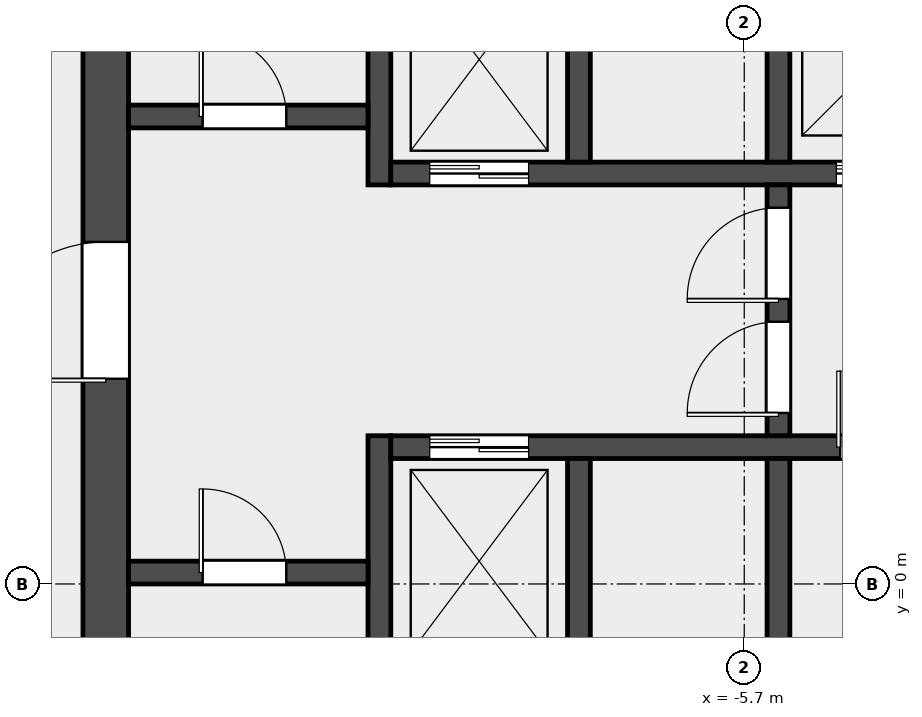
"""IFC4 building model, lengths in metres.
Left out: names, types, materials, properties, quantities, classifications, styles, units other than length and angle.
Written with IfcOpenShell. Run it as: python <this file> out.ifc"""

import sys

from ifc_helpers import new_model, si_unit, direction, frame, frame_2d, origin, place, context, subcontext, project, spatial, rectangle, extrude, element, fill, save


model = new_model("IFC4")
c1 = context("Model", 3, precision=1e-05, world=origin(), true_north=direction((0.0, 1.0)))
c2 = subcontext(c1, "Body", "Model", "MODEL_VIEW")
j1 = project(units=[si_unit("LENGTHUNIT", "METRE"), si_unit("PLANEANGLEUNIT", "RADIAN")], contexts=[c1])
p1 = place(None, origin())
s1 = spatial("IfcSite", under=j1, at=p1, CompositionType="ELEMENT")
p2 = place(p1, origin())
s2 = spatial("IfcBuilding", under=s1, at=p2, CompositionType="ELEMENT")
p3 = place(p2, frame((0.0, 0.0, 283.4)))
s3 = spatial("IfcBuildingStorey", under=s2, at=p3, CompositionType="ELEMENT", Elevation=283.4)
p4 = place(p3, frame((-14.1, -6.6, 0.0), z_axis=(0.0, 0.0, 1.0), x_axis=(0.0, 1.0, 0.0)))
e1 = element("IfcWall", 1, at=p4, inside=s3, PredefinedType="SHEAR", context=c2, shape_type="SweptSolid", body=[
    extrude(rectangle(XDim=19.5, YDim=0.6, at=frame_2d((9.75, 0.0))), origin(), (0.0, 0.0, 1.0), 3.7),
])
p5 = place(p4, frame((9.3, 0.0, 0.0)))
e2 = element("IfcOpeningElement", 2, at=p5, cuts=e1, PredefinedType="OPENING", context=c2, shape_type="SweptSolid", body=[
    extrude(rectangle(XDim=1.8, YDim=2.1, at=frame_2d((0.9, 1.05))), frame((0.0, 0.312, 0.0), z_axis=(0.0, -1.0, 0.0), x_axis=(1.0, 0.0, 0.0)), (0.0, 0.0, 1.0), 0.624),
])
p6 = place(p3, frame((-10.5, -6.6, 0.0), z_axis=(0.0, 0.0, 1.0), x_axis=(0.0, 1.0, 0.0)))
e3 = element("IfcWall", 3, at=p6, inside=s3, PredefinedType="SHEAR", context=c2, shape_type="SweptSolid", body=[
    extrude(rectangle(XDim=8.55, YDim=0.3, at=frame_2d((4.275, 0.0))), origin(), (0.0, 0.0, 1.0), 3.7),
])
p7 = place(p3, frame((-10.5, 5.25, 0.0), z_axis=(0.0, 0.0, 1.0), x_axis=(0.0, 1.0, 0.0)))
e4 = element("IfcWall", 4, at=p7, inside=s3, PredefinedType="SHEAR", context=c2, shape_type="SweptSolid", body=[
    extrude(rectangle(XDim=7.65, YDim=0.3, at=frame_2d((3.825, 0.0))), origin(), (0.0, 0.0, 1.0), 3.7),
])
p8 = place(p3, frame((-13.8, 0.15, 0.0), z_axis=(0.0, 0.0, 1.0), x_axis=(1.0, 0.0, 0.0)))
e5 = element("IfcWall", 5, at=p8, inside=s3, PredefinedType="SOLIDWALL", context=c2, shape_type="SweptSolid", body=[
    extrude(rectangle(XDim=3.15, YDim=0.3, at=frame_2d((1.575, 0.0))), origin(), (0.0, 0.0, 1.0), 3.7),
])
p9 = place(p8, frame((0.975, 0.0, 0.0)))
e6 = element("IfcOpeningElement", 6, at=p9, cuts=e5, PredefinedType="OPENING", context=c2, shape_type="SweptSolid", body=[
    extrude(rectangle(XDim=1.1, YDim=2.1, at=frame_2d((0.55, 1.05))), frame((0.0, 0.162, 0.0), z_axis=(0.0, -1.0, 0.0), x_axis=(1.0, 0.0, 0.0)), (0.0, 0.0, 1.0), 0.324),
])
p10 = place(p3, frame((-13.8, 6.15, 0.0), z_axis=(0.0, 0.0, 1.0), x_axis=(1.0, 0.0, 0.0)))
e7 = element("IfcWall", 7, at=p10, inside=s3, PredefinedType="SOLIDWALL", context=c2, shape_type="SweptSolid", body=[
    extrude(rectangle(XDim=3.15, YDim=0.3, at=frame_2d((1.575, 0.0))), origin(), (0.0, 0.0, 1.0), 3.7),
])
p11 = place(p10, frame((0.975, 0.0, 0.0)))
e8 = element("IfcOpeningElement", 8, at=p11, cuts=e7, PredefinedType="OPENING", context=c2, shape_type="SweptSolid", body=[
    extrude(rectangle(XDim=1.1, YDim=2.1, at=frame_2d((0.55, 1.05))), frame((0.0, 0.162, 0.0), z_axis=(0.0, -1.0, 0.0), x_axis=(1.0, 0.0, 0.0)), (0.0, 0.0, 1.0), 0.324),
])
p12 = place(p3, frame((-10.35, 1.8, 0.0), z_axis=(0.0, 0.0, 1.0), x_axis=(1.0, 0.0, 0.0)))
e9 = element("IfcWall", 9, at=p12, inside=s3, PredefinedType="SOLIDWALL", context=c2, shape_type="SweptSolid", body=[
    extrude(rectangle(XDim=20.7, YDim=0.3, at=frame_2d((10.35, 0.0))), origin(), (0.0, 0.0, 1.0), 3.7),
])
p13 = place(p12, frame((0.512, 0.0, 0.0)))
e10 = element("IfcOpeningElement", 10, at=p13, cuts=e9, PredefinedType="OPENING", context=c2, shape_type="SweptSolid", body=[
    extrude(rectangle(XDim=1.3, YDim=2.1, at=frame_2d((0.65, 1.05))), frame((0.0, 0.162, 0.0), z_axis=(0.0, -1.0, 0.0), x_axis=(1.0, 0.0, 0.0)), (0.0, 0.0, 1.0), 0.324),
])
p14 = place(p12, frame((5.913, 0.0, 0.0)))
e11 = element("IfcOpeningElement", 11, at=p14, cuts=e9, PredefinedType="OPENING", context=c2, shape_type="SweptSolid", body=[
    extrude(rectangle(XDim=1.0, YDim=2.1, at=frame_2d((0.5, 1.05))), frame((0.0, 0.162, 0.0), z_axis=(0.0, -1.0, 0.0), x_axis=(1.0, 0.0, 0.0)), (0.0, 0.0, 1.0), 0.324),
])
p15 = place(p12, frame((11.163, 0.0, 0.0)))
e12 = element("IfcOpeningElement", 12, at=p15, cuts=e9, PredefinedType="OPENING", context=c2, shape_type="SweptSolid", body=[
    extrude(rectangle(XDim=1.0, YDim=2.1, at=frame_2d((0.5, 1.05))), frame((0.0, 0.162, 0.0), z_axis=(0.0, -1.0, 0.0), x_axis=(1.0, 0.0, 0.0)), (0.0, 0.0, 1.0), 0.324),
])
p16 = place(p12, frame((17.725, 0.0, 0.0)))
e13 = element("IfcOpeningElement", 13, at=p16, cuts=e9, PredefinedType="OPENING", context=c2, shape_type="SweptSolid", body=[
    extrude(rectangle(XDim=1.0, YDim=2.1, at=frame_2d((0.5, 1.05))), frame((0.0, 0.162, 0.0), z_axis=(0.0, -1.0, 0.0), x_axis=(1.0, 0.0, 0.0)), (0.0, 0.0, 1.0), 0.324),
])
p17 = place(p3, frame((-10.35, 5.4, 0.0), z_axis=(0.0, 0.0, 1.0), x_axis=(1.0, 0.0, 0.0)))
e14 = element("IfcWall", 14, at=p17, inside=s3, PredefinedType="SOLIDWALL", context=c2, shape_type="SweptSolid", body=[
    extrude(rectangle(XDim=20.7, YDim=0.3, at=frame_2d((10.35, 0.0))), origin(), (0.0, 0.0, 1.0), 3.7),
])
p18 = place(p17, frame((0.512, 0.0, 0.0)))
e15 = element("IfcOpeningElement", 15, at=p18, cuts=e14, PredefinedType="OPENING", context=c2, shape_type="SweptSolid", body=[
    extrude(rectangle(XDim=1.3, YDim=2.1, at=frame_2d((0.65, 1.05))), frame((0.0, 0.162, 0.0), z_axis=(0.0, -1.0, 0.0), x_axis=(1.0, 0.0, 0.0)), (0.0, 0.0, 1.0), 0.324),
])
p19 = place(p17, frame((5.863, 0.0, 0.0)))
e16 = element("IfcOpeningElement", 16, at=p19, cuts=e14, PredefinedType="OPENING", context=c2, shape_type="SweptSolid", body=[
    extrude(rectangle(XDim=1.1, YDim=2.1, at=frame_2d((0.55, 1.05))), frame((0.0, 0.162, 0.0), z_axis=(0.0, -1.0, 0.0), x_axis=(1.0, 0.0, 0.0)), (0.0, 0.0, 1.0), 0.324),
])
p20 = place(p17, frame((8.488, 0.0, 0.0)))
e17 = element("IfcOpeningElement", 17, at=p20, cuts=e14, PredefinedType="OPENING", context=c2, shape_type="SweptSolid", body=[
    extrude(rectangle(XDim=1.1, YDim=2.1, at=frame_2d((0.55, 1.05))), frame((0.0, 0.162, 0.0), z_axis=(0.0, -1.0, 0.0), x_axis=(1.0, 0.0, 0.0)), (0.0, 0.0, 1.0), 0.324),
])
p21 = place(p17, frame((11.113, 0.0, 0.0)))
e18 = element("IfcOpeningElement", 18, at=p21, cuts=e14, PredefinedType="OPENING", context=c2, shape_type="SweptSolid", body=[
    extrude(rectangle(XDim=1.1, YDim=2.1, at=frame_2d((0.55, 1.05))), frame((0.0, 0.162, 0.0), z_axis=(0.0, -1.0, 0.0), x_axis=(1.0, 0.0, 0.0)), (0.0, 0.0, 1.0), 0.324),
])
p22 = place(p17, frame((13.738, 0.0, 0.0)))
e19 = element("IfcOpeningElement", 19, at=p22, cuts=e14, PredefinedType="OPENING", context=c2, shape_type="SweptSolid", body=[
    extrude(rectangle(XDim=1.1, YDim=2.1, at=frame_2d((0.55, 1.05))), frame((0.0, 0.162, 0.0), z_axis=(0.0, -1.0, 0.0), x_axis=(1.0, 0.0, 0.0)), (0.0, 0.0, 1.0), 0.324),
])
p23 = place(p17, frame((16.363, 0.0, 0.0)))
e20 = element("IfcOpeningElement", 20, at=p23, cuts=e14, PredefinedType="OPENING", context=c2, shape_type="SweptSolid", body=[
    extrude(rectangle(XDim=1.1, YDim=2.1, at=frame_2d((0.55, 1.05))), frame((0.0, 0.162, 0.0), z_axis=(0.0, -1.0, 0.0), x_axis=(1.0, 0.0, 0.0)), (0.0, 0.0, 1.0), 0.324),
])
p24 = place(p17, frame((18.988, 0.0, 0.0)))
e21 = element("IfcOpeningElement", 21, at=p24, cuts=e14, PredefinedType="OPENING", context=c2, shape_type="SweptSolid", body=[
    extrude(rectangle(XDim=1.1, YDim=2.1, at=frame_2d((0.55, 1.05))), frame((0.0, 0.162, 0.0), z_axis=(0.0, -1.0, 0.0), x_axis=(1.0, 0.0, 0.0)), (0.0, 0.0, 1.0), 0.324),
])
for number, where, z_axis, x_axis in (
    (22, (-7.875, -1.05, 0.0), (0.0, 0.0, 1.0), (0.0, 1.0, 0.0)),
    (23, (-5.25, -1.05, 0.0), (0.0, 0.0, 1.0), (0.0, 1.0, 0.0)),
    (24, (-7.875, 5.55, 0.0), (0.0, 0.0, 1.0), (0.0, 1.0, 0.0)),
    (25, (-5.25, 5.55, 0.0), (0.0, 0.0, 1.0), (0.0, 1.0, 0.0)),
):
    element("IfcWall", number, at=place(p3, frame(where, z_axis=z_axis, x_axis=x_axis)), inside=s3, PredefinedType="SOLIDWALL", context=c2, shape_type="SweptSolid", body=[
        extrude(rectangle(XDim=2.7, YDim=0.3, at=frame_2d((1.35, 0.0))), origin(), (0.0, 0.0, 1.0), 3.7),
    ])
p25 = place(p3, frame((-5.25, 1.95, 0.0), z_axis=(0.0, 0.0, 1.0), x_axis=(0.0, 1.0, 0.0)))
e26 = element("IfcWall", 26, at=p25, inside=s3, PredefinedType="SOLIDWALL", context=c2, shape_type="SweptSolid", body=[
    extrude(rectangle(XDim=3.3, YDim=0.3, at=frame_2d((1.65, 0.0))), origin(), (0.0, 0.0, 1.0), 3.7),
])
p26 = place(p25, frame((0.3, 0.0, 0.0)))
e27 = element("IfcOpeningElement", 27, at=p26, cuts=e26, PredefinedType="OPENING", context=c2, shape_type="SweptSolid", body=[
    extrude(rectangle(XDim=1.2, YDim=2.1, at=frame_2d((0.6, 1.05))), frame((0.0, 0.162, 0.0), z_axis=(0.0, -1.0, 0.0), x_axis=(1.0, 0.0, 0.0)), (0.0, 0.0, 1.0), 0.324),
])
p27 = place(p25, frame((1.8, 0.0, 0.0)))
e28 = element("IfcOpeningElement", 28, at=p27, cuts=e26, PredefinedType="OPENING", context=c2, shape_type="SweptSolid", body=[
    extrude(rectangle(XDim=1.2, YDim=2.1, at=frame_2d((0.6, 1.05))), frame((0.0, 0.162, 0.0), z_axis=(0.0, -1.0, 0.0), x_axis=(1.0, 0.0, 0.0)), (0.0, 0.0, 1.0), 0.324),
])
p28 = place(p9, origin())
e29 = element("IfcDoor", 29, at=p28, inside=s3, OperationType="SINGLE_SWING_LEFT", PredefinedType="DOOR", context=c2, shape_type="SweptSolid", body=[
    extrude(rectangle(XDim=1.1, YDim=2.1, at=frame_2d((0.55, 1.05))), frame((0.0, 0.025, 0.0), z_axis=(0.0, -1.0, 0.0), x_axis=(1.0, 0.0, 0.0)), (0.0, 0.0, 1.0), 0.05),
])
fill(e6, e29)
p29 = place(p11, origin())
e30 = element("IfcDoor", 30, at=p29, inside=s3, OperationType="SINGLE_SWING_LEFT", PredefinedType="DOOR", context=c2, shape_type="SweptSolid", body=[
    extrude(rectangle(XDim=1.1, YDim=2.1, at=frame_2d((0.55, 1.05))), frame((0.0, 0.025, 0.0), z_axis=(0.0, -1.0, 0.0), x_axis=(1.0, 0.0, 0.0)), (0.0, 0.0, 1.0), 0.05),
])
fill(e8, e30)
p30 = place(p5, origin())
e31 = element("IfcDoor", 31, at=p30, inside=s3, OperationType="DOUBLE_DOOR_SINGLE_SWING", PredefinedType="DOOR", context=c2, shape_type="SweptSolid", body=[
    extrude(rectangle(XDim=1.8, YDim=2.1, at=frame_2d((0.9, 1.05))), frame((0.0, 0.025, 0.0), z_axis=(0.0, -1.0, 0.0), x_axis=(1.0, 0.0, 0.0)), (0.0, 0.0, 1.0), 0.05),
])
fill(e2, e31)
p31 = place(p26, origin())
e32 = element("IfcDoor", 32, at=p31, inside=s3, OperationType="SINGLE_SWING_LEFT", PredefinedType="DOOR", context=c2, shape_type="SweptSolid", body=[
    extrude(rectangle(XDim=1.2, YDim=2.1, at=frame_2d((0.6, 1.05))), frame((0.0, 0.025, 0.0), z_axis=(0.0, -1.0, 0.0), x_axis=(1.0, 0.0, 0.0)), (0.0, 0.0, 1.0), 0.05),
])
fill(e27, e32)
p32 = place(p27, origin())
e33 = element("IfcDoor", 33, at=p32, inside=s3, OperationType="SINGLE_SWING_RIGHT", PredefinedType="DOOR", context=c2, shape_type="SweptSolid", body=[
    extrude(rectangle(XDim=1.2, YDim=2.1, at=frame_2d((0.6, 1.05))), frame((0.0, 0.025, 0.0), z_axis=(0.0, -1.0, 0.0), x_axis=(1.0, 0.0, 0.0)), (0.0, 0.0, 1.0), 0.05),
])
fill(e28, e33)
p33 = place(p13, origin())
e34 = element("IfcDoor", 34, at=p33, inside=s3, OperationType="DOUBLE_DOOR_SLIDING", PredefinedType="DOOR", context=c2, shape_type="SweptSolid", body=[
    extrude(rectangle(XDim=1.3, YDim=2.1, at=frame_2d((0.65, 1.05))), frame((0.0, 0.025, 0.0), z_axis=(0.0, -1.0, 0.0), x_axis=(1.0, 0.0, 0.0)), (0.0, 0.0, 1.0), 0.05),
])
fill(e10, e34)
p34 = place(p18, origin())
e35 = element("IfcDoor", 35, at=p34, inside=s3, OperationType="DOUBLE_DOOR_SLIDING", PredefinedType="DOOR", context=c2, shape_type="SweptSolid", body=[
    extrude(rectangle(XDim=1.3, YDim=2.1, at=frame_2d((0.65, 1.05))), frame((0.0, 0.025, 0.0), z_axis=(0.0, -1.0, 0.0), x_axis=(1.0, 0.0, 0.0)), (0.0, 0.0, 1.0), 0.05),
])
fill(e15, e35)
p35 = place(p19, origin())
e36 = element("IfcDoor", 36, at=p35, inside=s3, OperationType="DOUBLE_DOOR_SLIDING", PredefinedType="DOOR", context=c2, shape_type="SweptSolid", body=[
    extrude(rectangle(XDim=1.1, YDim=2.1, at=frame_2d((0.55, 1.05))), frame((0.0, 0.025, 0.0), z_axis=(0.0, -1.0, 0.0), x_axis=(1.0, 0.0, 0.0)), (0.0, 0.0, 1.0), 0.05),
])
fill(e16, e36)
p36 = place(p14, origin())
e37 = element("IfcDoor", 37, at=p36, inside=s3, OperationType="SINGLE_SWING_LEFT", PredefinedType="DOOR", context=c2, shape_type="SweptSolid", body=[
    extrude(rectangle(XDim=1.0, YDim=2.1, at=frame_2d((0.5, 1.05))), frame((0.0, 0.025, 0.0), z_axis=(0.0, -1.0, 0.0), x_axis=(1.0, 0.0, 0.0)), (0.0, 0.0, 1.0), 0.05),
])
fill(e11, e37)
save(model, sys.argv[1])
